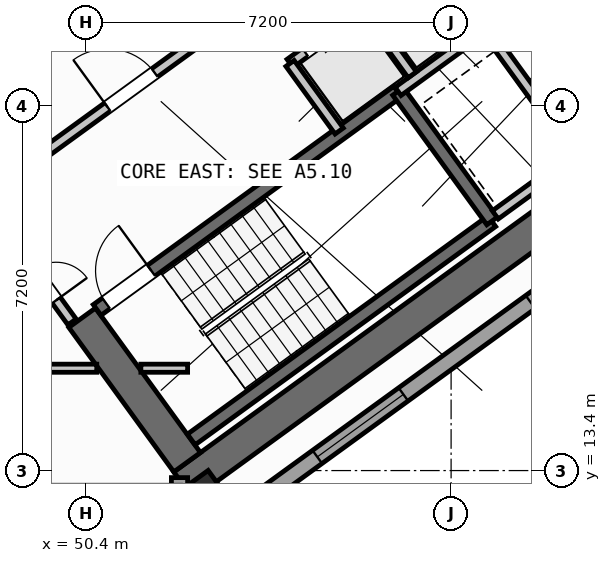
"""IFC4 building model, lengths in metres.
Left out: names, types, materials, properties, quantities, classifications, styles, units other than length and angle.
Written with IfcOpenShell. Run it as: python <this file> out.ifc"""

import sys

from ifc_helpers import new_model, si_unit, direction, frame, frame_2d, origin, origin_2d, place, context, subcontext, project, spatial, rectangle, hollow_rectangle, extrude, source, transform, mapped, element, fill, save


model = new_model("IFC4")
c1 = context("Model", 3, precision=1e-05, world=origin(), true_north=direction((0.0, 1.0)))
c2 = subcontext(c1, "Body", "Model", "MODEL_VIEW")
j1 = project(units=[si_unit("LENGTHUNIT", "METRE"), si_unit("PLANEANGLEUNIT", "RADIAN")], contexts=[c1])
p1 = place(None, origin())
s1 = spatial("IfcSite", under=j1, at=p1, CompositionType="ELEMENT")
p2 = place(p1, origin())
s2 = spatial("IfcBuilding", under=s1, at=p2, CompositionType="ELEMENT")
p3 = place(p2, frame((0.0, 0.0, 93.6)))
s3 = spatial("IfcBuildingStorey", under=s2, at=p3, CompositionType="ELEMENT", Elevation=93.6)
p4 = place(p3, frame((52.318, 13.11, 0.0), z_axis=(0.0, 0.0, 1.0), x_axis=(0.809019445368, 0.587781878776, 0.0)))
e1 = element("IfcWall", 1, at=p4, inside=s3, PredefinedType="SHEAR", context=c2, shape_type="SweptSolid", body=[
    extrude(rectangle(XDim=12.44, YDim=0.65, at=frame_2d((6.22, 0.0))), origin(), (0.0, 0.0, 1.0), 3.35),
])
p5 = place(p3, frame((52.39, 13.564, 0.0), z_axis=(0.0, 0.0, 1.0), x_axis=(-0.58779688989, 0.809008539037, 0.0)))
e2 = element("IfcWall", 2, at=p5, inside=s3, PredefinedType="SHEAR", context=c2, shape_type="SweptSolid", body=[
    extrude(rectangle(XDim=3.525, YDim=0.65, at=frame_2d((1.763, 0.0))), origin(), (0.0, 0.0, 1.0), 3.35),
])
m1 = source(origin(), c2, "Body", "SweptSolid", [
    extrude(hollow_rectangle(XDim=0.9, YDim=0.9, WallThickness=0.036, at=origin_2d()), origin(), (0.0, 0.0, 1.0), 3.6),
])
p6 = place(p3, frame((52.705, 12.773, 0.0), z_axis=(0.0, 0.0, 1.0), x_axis=(0.809016994375, 0.587785252292, 0.0)))
e3 = element("IfcColumn", 3, at=p6, inside=s3, PredefinedType="COLUMN", context=c2, shape_type="MappedRepresentation", body=[
    mapped(m1, transform((0.0, 0.0, 0.0), scale=1.0)),
])
p7 = place(p3, frame((67.454, 22.747, 0.0), z_axis=(0.0, 0.0, 1.0), x_axis=(-0.809021120468, -0.587779573171, 0.0)))
e4 = element("IfcWall", 4, at=p7, inside=s3, PredefinedType="STANDARD", context=c2, shape_type="SweptSolid", body=[
    extrude(rectangle(XDim=17.588, YDim=0.32, at=frame_2d((8.794, 0.0))), origin(), (0.0, 0.0, 1.0), 3.35),
])
p8 = place(p7, frame((1.624, 0.0, 0.0)))
e5 = element("IfcOpeningElement", 5, at=p8, cuts=e4, PredefinedType="OPENING", context=c2, shape_type="SweptSolid", body=[
    extrude(rectangle(XDim=1.05, YDim=2.15, at=frame_2d((0.525, 1.075))), frame((0.0, 0.17, 0.0), z_axis=(0.0, -1.0, 0.0), x_axis=(1.0, 0.0, 0.0)), (0.0, 0.0, 1.0), 0.34),
])
p9 = place(p7, frame((8.144, 0.0, 0.8)))
e6 = element("IfcOpeningElement", 6, at=p9, cuts=e4, PredefinedType="OPENING", context=c2, shape_type="SweptSolid", body=[
    extrude(rectangle(XDim=2.1, YDim=1.55, at=frame_2d((1.05, 0.775))), frame((0.0, 0.17, 0.0), z_axis=(0.0, -1.0, 0.0), x_axis=(1.0, 0.0, 0.0)), (0.0, 0.0, 1.0), 0.34),
])
p10 = place(p7, frame((13.344, 0.0, 0.8)))
e7 = element("IfcOpeningElement", 7, at=p10, cuts=e4, PredefinedType="OPENING", context=c2, shape_type="SweptSolid", body=[
    extrude(rectangle(XDim=2.1, YDim=1.55, at=frame_2d((1.05, 0.775))), frame((0.0, 0.17, 0.0), z_axis=(0.0, -1.0, 0.0), x_axis=(1.0, 0.0, 0.0)), (0.0, 0.0, 1.0), 0.34),
])
p11 = place(p3, frame((52.24, 13.261, 0.0), z_axis=(0.0, 0.0, 1.0), x_axis=(0.0, -1.0, 0.0)))
e8 = element("IfcWall", 8, at=p11, inside=s3, PredefinedType="STANDARD", context=c2, shape_type="SweptSolid", body=[
    extrude(rectangle(XDim=9.795, YDim=0.32, at=frame_2d((4.897, 0.0))), origin(), (0.0, 0.0, 1.0), 3.35),
])
p12 = place(p11, frame((2.307, 0.0, 0.8)))
e9 = element("IfcOpeningElement", 9, at=p12, cuts=e8, PredefinedType="OPENING", context=c2, shape_type="SweptSolid", body=[
    extrude(rectangle(XDim=2.1, YDim=1.55, at=frame_2d((1.05, 0.775))), frame((0.0, 0.17, 0.0), z_axis=(0.0, -1.0, 0.0), x_axis=(1.0, 0.0, 0.0)), (0.0, 0.0, 1.0), 0.34),
])
p13 = place(p11, frame((7.03, 0.0, 0.85)))
e10 = element("IfcOpeningElement", 10, at=p13, cuts=e8, PredefinedType="OPENING", context=c2, shape_type="SweptSolid", body=[
    extrude(rectangle(XDim=1.8, YDim=1.5, at=frame_2d((0.9, 0.75))), frame((0.0, 0.17, 0.0), z_axis=(0.0, -1.0, 0.0), x_axis=(1.0, 0.0, 0.0)), (0.0, 0.0, 1.0), 0.34),
])
p14 = place(p3, frame((52.472, 14.013, 0.0), z_axis=(0.0, 0.0, 1.0), x_axis=(0.809028366311, 0.587769599847, 0.0)))
e11 = element("IfcWall", 11, at=p14, inside=s3, PredefinedType="SHEAR", context=c2, shape_type="SweptSolid", body=[
    extrude(rectangle(XDim=7.33, YDim=0.26, at=frame_2d((3.665, 0.0))), origin(), (0.0, 0.0, 1.0), 3.35),
])
p15 = place(p3, frame((50.615, 16.57, 0.0), z_axis=(0.0, 0.0, 1.0), x_axis=(0.809028366311, 0.587769599847, 0.0)))
e12 = element("IfcWall", 12, at=p15, inside=s3, PredefinedType="SHEAR", context=c2, shape_type="SweptSolid", body=[
    extrude(rectangle(XDim=7.33, YDim=0.26, at=frame_2d((3.665, 0.0))), origin(), (0.0, 0.0, 1.0), 3.35),
])
p16 = place(p15, frame((0.22, 0.0, 0.0)))
e13 = element("IfcOpeningElement", 13, at=p16, cuts=e12, PredefinedType="OPENING", context=c2, shape_type="SweptSolid", body=[
    extrude(rectangle(XDim=1.1, YDim=2.1, at=frame_2d((0.55, 1.05))), frame((0.0, 0.14, 0.0), z_axis=(0.0, -1.0, 0.0), x_axis=(1.0, 0.0, 0.0)), (0.0, 0.0, 1.0), 0.28),
])
p17 = place(p3, frame((58.41, 18.327, 0.0), z_axis=(0.0, 0.0, 1.0), x_axis=(-0.58776738483, 0.809029975545, 0.0)))
e14 = element("IfcWall", 14, at=p17, inside=s3, PredefinedType="SHEAR", context=c2, shape_type="SweptSolid", body=[
    extrude(rectangle(XDim=3.16, YDim=0.26, at=frame_2d((1.58, 0.0))), origin(), (0.0, 0.0, 1.0), 3.35),
])
p18 = place(p3, frame((47.106, 21.437, 0.0), z_axis=(0.0, 0.0, 1.0), x_axis=(0.809012514015, 0.58779141893, 0.0)))
e15 = element("IfcWall", 15, at=p18, inside=s3, PredefinedType="STANDARD", context=c2, shape_type="SweptSolid", body=[
    extrude(rectangle(XDim=3.398, YDim=0.2, at=frame_2d((1.699, 0.0))), origin(), (0.0, 0.0, 1.0), 3.34),
])
p19 = place(p18, frame((0.408, 0.0, 0.0)))
e16 = element("IfcOpeningElement", 16, at=p19, cuts=e15, PredefinedType="OPENING", context=c2, shape_type="SweptSolid", body=[
    extrude(rectangle(XDim=1.3, YDim=2.2, at=frame_2d((0.65, 1.1))), frame((0.0, 0.11, 0.0), z_axis=(0.0, -1.0, 0.0), x_axis=(1.0, 0.0, 0.0)), (0.0, 0.0, 1.0), 0.22),
])
p20 = place(p3, frame((48.799, 19.107, 0.0), z_axis=(0.0, 0.0, 1.0), x_axis=(0.809012959416, 0.587790805897, 0.0)))
e17 = element("IfcWall", 17, at=p20, inside=s3, PredefinedType="STANDARD", context=c2, shape_type="SweptSolid", body=[
    extrude(rectangle(XDim=5.718, YDim=0.2, at=frame_2d((2.859, 0.0))), origin(), (0.0, 0.0, 1.0), 3.34),
])
p21 = place(p20, frame((2.498, 0.0, 0.0)))
e18 = element("IfcOpeningElement", 18, at=p21, cuts=e17, PredefinedType="OPENING", context=c2, shape_type="SweptSolid", body=[
    extrude(rectangle(XDim=1.15, YDim=2.1, at=frame_2d((0.575, 1.05))), frame((0.0, 0.11, 0.0), z_axis=(0.0, -1.0, 0.0), x_axis=(1.0, 0.0, 0.0)), (0.0, 0.0, 1.0), 0.22),
])
p22 = place(p3, frame((56.553, 20.884, 0.0), z_axis=(0.0, 0.0, 1.0), x_axis=(0.809035789462, 0.587759382205, 0.0)))
e19 = element("IfcWall", 19, at=p22, inside=s3, PredefinedType="STANDARD", context=c2, shape_type="SweptSolid", body=[
    extrude(rectangle(XDim=3.768, YDim=0.2, at=frame_2d((1.884, 0.0))), origin(), (0.0, 0.0, 1.0), 3.34),
])
p23 = place(p22, frame((2.65, 0.0, 0.0)))
e20 = element("IfcOpeningElement", 20, at=p23, cuts=e19, PredefinedType="OPENING", context=c2, shape_type="SweptSolid", body=[
    extrude(rectangle(XDim=0.86, YDim=2.05, at=frame_2d((0.43, 1.025))), frame((0.0, 0.11, 0.0), z_axis=(0.0, -1.0, 0.0), x_axis=(1.0, 0.0, 0.0)), (0.0, 0.0, 1.0), 0.22),
])
p24 = place(p3, frame((54.421, 21.436, 0.0), z_axis=(0.0, 0.0, 1.0), x_axis=(0.809013710463, 0.587789772183, 0.0)))
e21 = element("IfcWall", 21, at=p24, inside=s3, PredefinedType="STANDARD", context=c2, shape_type="SweptSolid", body=[
    extrude(rectangle(XDim=5.36, YDim=0.2, at=frame_2d((2.68, 0.0))), origin(), (0.0, 0.0, 1.0), 3.34),
])
p25 = place(p24, frame((0.37, 0.0, 0.0)))
e22 = element("IfcOpeningElement", 22, at=p25, cuts=e21, PredefinedType="OPENING", context=c2, shape_type="SweptSolid", body=[
    extrude(rectangle(XDim=1.1, YDim=2.15, at=frame_2d((0.55, 1.075))), frame((0.0, 0.11, 0.0), z_axis=(0.0, -1.0, 0.0), x_axis=(1.0, 0.0, 0.0)), (0.0, 0.0, 1.0), 0.22),
])
p26 = place(p24, frame((2.17, 0.0, 0.0)))
e23 = element("IfcOpeningElement", 23, at=p26, cuts=e21, PredefinedType="OPENING", context=c2, shape_type="SweptSolid", body=[
    extrude(rectangle(XDim=1.1, YDim=2.15, at=frame_2d((0.55, 1.075))), frame((0.0, 0.11, 0.0), z_axis=(0.0, -1.0, 0.0), x_axis=(1.0, 0.0, 0.0)), (0.0, 0.0, 1.0), 0.22),
])
p27 = place(p24, frame((3.97, 0.0, 0.0)))
e24 = element("IfcOpeningElement", 24, at=p27, cuts=e21, PredefinedType="OPENING", context=c2, shape_type="SweptSolid", body=[
    extrude(rectangle(XDim=1.1, YDim=2.15, at=frame_2d((0.55, 1.075))), frame((0.0, 0.11, 0.0), z_axis=(0.0, -1.0, 0.0), x_axis=(1.0, 0.0, 0.0)), (0.0, 0.0, 1.0), 0.22),
])
p28 = place(p3, frame((55.391, 20.102, 0.0), z_axis=(0.0, 0.0, 1.0), x_axis=(-0.58778447739, 0.809017557374, 0.0)))
e25 = element("IfcWall", 25, at=p28, inside=s3, PredefinedType="STANDARD", context=c2, shape_type="SweptSolid", body=[
    extrude(rectangle(XDim=1.65, YDim=0.2, at=frame_2d((0.825, 0.0))), origin(), (0.0, 0.0, 1.0), 3.34),
])
p29 = place(p3, frame((56.834, 21.212, 0.0), z_axis=(0.0, 0.0, 1.0), x_axis=(-0.58776738483, 0.809029975545, 0.0)))
e26 = element("IfcWall", 26, at=p29, inside=s3, PredefinedType="STANDARD", context=c2, shape_type="SweptSolid", body=[
    extrude(rectangle(XDim=1.58, YDim=0.2, at=frame_2d((0.79, 0.0))), origin(), (0.0, 0.0, 1.0), 3.34),
])
p30 = place(p3, frame((60.067, 19.655, 0.0), z_axis=(0.0, 0.0, 1.0), x_axis=(-0.587800520745, 0.809005900975, 0.0)))
e27 = element("IfcWall", 27, at=p30, inside=s3, PredefinedType="STANDARD", context=c2, shape_type="SweptSolid", body=[
    extrude(rectangle(XDim=2.66, YDim=0.2, at=frame_2d((1.33, 0.0))), origin(), (0.0, 0.0, 1.0), 3.34),
])
p31 = place(p3, frame((58.472, 18.447, 0.0), z_axis=(0.0, 0.0, 1.0), x_axis=(0.809022487728, 0.587777691266, 0.0)))
e28 = element("IfcWall", 28, at=p31, inside=s3, PredefinedType="STANDARD", context=c2, shape_type="SweptSolid", body=[
    extrude(rectangle(XDim=3.648, YDim=0.2, at=frame_2d((1.824, 0.0))), origin(), (0.0, 0.0, 1.0), 3.34),
])
p32 = place(p3, frame((35.296, 15.42, 0.0), z_axis=(0.0, 0.0, 1.0), x_axis=(1.0, 0.0, 0.0)))
e29 = element("IfcWall", 29, at=p32, inside=s3, PredefinedType="PARTITIONING", context=c2, shape_type="SweptSolid", body=[
    extrude(rectangle(XDim=15.311, YDim=0.16, at=frame_2d((7.655, 0.0))), origin(), (0.0, 0.0, 1.0), 3.34),
])
p33 = place(p32, frame((0.615, 0.0, 0.0)))
e30 = element("IfcOpeningElement", 30, at=p33, cuts=e29, PredefinedType="OPENING", context=c2, shape_type="SweptSolid", body=[
    extrude(rectangle(XDim=1.0, YDim=2.1, at=frame_2d((0.5, 1.05))), frame((0.0, 0.09, 0.0), z_axis=(0.0, -1.0, 0.0), x_axis=(1.0, 0.0, 0.0)), (0.0, 0.0, 1.0), 0.18),
])
p34 = place(p32, frame((9.035, 0.0, 0.0)))
e31 = element("IfcOpeningElement", 31, at=p34, cuts=e29, PredefinedType="OPENING", context=c2, shape_type="SweptSolid", body=[
    extrude(rectangle(XDim=1.0, YDim=2.1, at=frame_2d((0.5, 1.05))), frame((0.0, 0.09, 0.0), z_axis=(0.0, -1.0, 0.0), x_axis=(1.0, 0.0, 0.0)), (0.0, 0.0, 1.0), 0.18),
])
p35 = place(p3, frame((51.477, 15.42, 0.0), z_axis=(0.0, 0.0, 1.0), x_axis=(1.0, 0.0, 0.0)))
e32 = element("IfcWall", 32, at=p35, inside=s3, PredefinedType="PARTITIONING", context=c2, shape_type="SweptSolid", body=[
    extrude(rectangle(XDim=0.923, YDim=0.16, at=frame_2d((0.461, 0.0))), origin(), (0.0, 0.0, 1.0), 3.34),
])
p36 = place(p3, frame((50.119, 16.333, 0.0), z_axis=(0.0, 0.0, 1.0), x_axis=(-0.587749856981, 0.809042709391, 0.0)))
e33 = element("IfcWall", 33, at=p36, inside=s3, PredefinedType="STANDARD", context=c2, shape_type="SweptSolid", body=[
    extrude(rectangle(XDim=2.96, YDim=0.2, at=frame_2d((1.48, 0.0))), origin(), (0.0, 0.0, 1.0), 3.34),
])
p37 = place(p36, frame((0.53, 0.0, 0.0)))
e34 = element("IfcOpeningElement", 34, at=p37, cuts=e33, PredefinedType="OPENING", context=c2, shape_type="SweptSolid", body=[
    extrude(rectangle(XDim=1.5, YDim=2.15, at=frame_2d((0.75, 1.075))), frame((0.0, 0.11, 0.0), z_axis=(0.0, -1.0, 0.0), x_axis=(1.0, 0.0, 0.0)), (0.0, 0.0, 1.0), 0.22),
])
m2 = source(origin(), c2, "Body", "SweptSolid", [
    extrude(rectangle(XDim=2.1, YDim=1.55, at=frame_2d((1.05, 0.775))), frame((0.0, 0.03, 0.0), z_axis=(0.0, -1.0, 0.0), x_axis=(1.0, 0.0, 0.0)), (0.0, 0.0, 1.0), 0.06),
])
p38 = place(p9, origin())
e35 = element("IfcWindow", 35, at=p38, inside=s3, PartitioningType="SINGLE_PANEL", PredefinedType="WINDOW", context=c2, shape_type="MappedRepresentation", body=[
    mapped(m2, transform((0.0, 0.0, 0.0), scale=1.0)),
])
fill(e6, e35)
p39 = place(p10, origin())
e36 = element("IfcWindow", 36, at=p39, inside=s3, PartitioningType="SINGLE_PANEL", PredefinedType="WINDOW", context=c2, shape_type="MappedRepresentation", body=[
    mapped(m2, transform((0.0, 0.0, 0.0), scale=1.0)),
])
fill(e7, e36)
m3 = source(origin(), c2, "Body", "SweptSolid", [
    extrude(rectangle(XDim=1.1, YDim=2.1, at=frame_2d((0.55, 1.05))), frame((0.0, 0.025, 0.0), z_axis=(0.0, -1.0, 0.0), x_axis=(1.0, 0.0, 0.0)), (0.0, 0.0, 1.0), 0.05),
])
p40 = place(p16, origin())
e37 = element("IfcDoor", 37, at=p40, inside=s3, OperationType="SINGLE_SWING_RIGHT", PredefinedType="DOOR", context=c2, shape_type="MappedRepresentation", body=[
    mapped(m3, transform((0.0, 0.0, 0.0), scale=1.0)),
])
fill(e13, e37)
m4 = source(origin(), c2, "Body", "SweptSolid", [
    extrude(rectangle(XDim=1.15, YDim=2.1, at=frame_2d((0.575, 1.05))), frame((0.0, 0.025, 0.0), z_axis=(0.0, -1.0, 0.0), x_axis=(1.0, 0.0, 0.0)), (0.0, 0.0, 1.0), 0.05),
])
p41 = place(p21, origin())
e38 = element("IfcDoor", 38, at=p41, inside=s3, OperationType="SINGLE_SWING_LEFT", PredefinedType="DOOR", context=c2, shape_type="MappedRepresentation", body=[
    mapped(m4, transform((0.0, 0.0, 0.0), scale=1.0)),
])
fill(e18, e38)
m5 = source(origin(), c2, "Body", "SweptSolid", [
    extrude(rectangle(XDim=1.1, YDim=2.15, at=frame_2d((0.55, 1.075))), frame((0.0, 0.025, 0.0), z_axis=(0.0, -1.0, 0.0), x_axis=(1.0, 0.0, 0.0)), (0.0, 0.0, 1.0), 0.05),
])
p42 = place(p25, origin())
e39 = element("IfcDoor", 39, at=p42, inside=s3, OperationType="DOUBLE_DOOR_SLIDING", PredefinedType="DOOR", context=c2, shape_type="MappedRepresentation", body=[
    mapped(m5, transform((0.0, 0.0, 0.0), scale=1.0)),
])
fill(e22, e39)
m6 = source(origin(), c2, "Body", "SweptSolid", [
    extrude(rectangle(XDim=1.5, YDim=2.15, at=frame_2d((0.75, 1.075))), frame((0.0, 0.025, 0.0), z_axis=(0.0, -1.0, 0.0), x_axis=(1.0, 0.0, 0.0)), (0.0, 0.0, 1.0), 0.05),
])
p43 = place(p37, frame((1.5, 0.0, 0.0), z_axis=(0.0, 0.0, 1.0), x_axis=(-1.0, 0.0, 0.0)))
e40 = element("IfcDoor", 40, at=p43, inside=s3, OperationType="DOUBLE_DOOR_SINGLE_SWING", PredefinedType="DOOR", context=c2, shape_type="MappedRepresentation", body=[
    mapped(m6, transform((0.0, 0.0, 0.0), scale=1.0)),
])
fill(e34, e40)
save(model, sys.argv[1])
